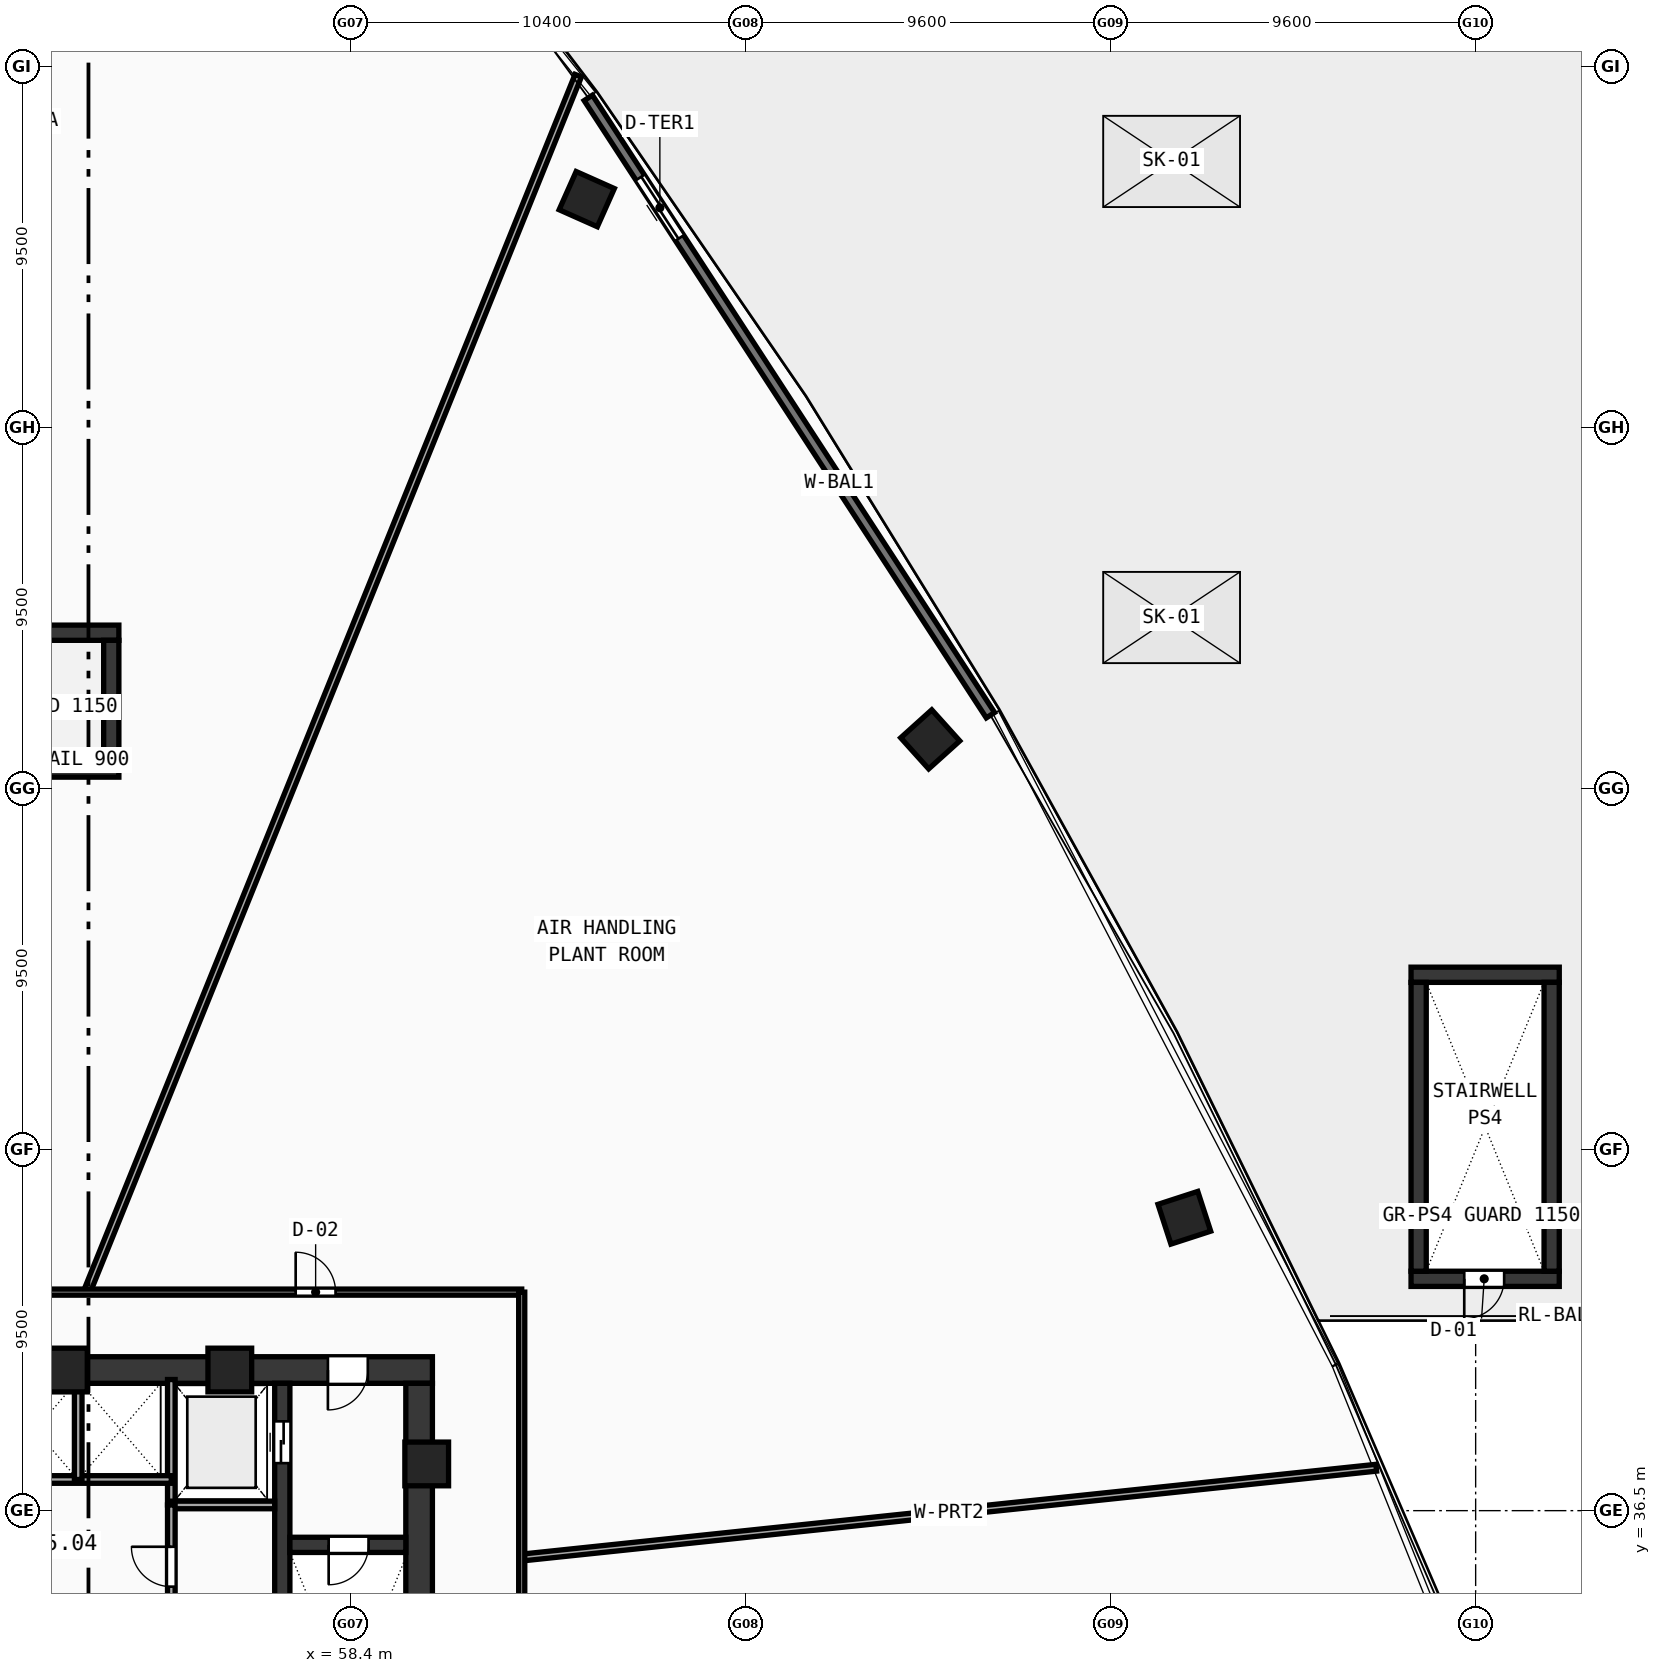
"""IFC4 building model, lengths in metres.
Left out: names, types, materials, properties, quantities, classifications, styles, units other than length and angle.
Written with IfcOpenShell. Run it as: python <this file> out.ifc"""

import sys

from ifc_helpers import new_model, si_unit, direction, frame, frame_2d, origin, origin_with_axes, origin_2d, place, context, subcontext, project, spatial, rectangle, hollow_rectangle, extrude, source, transform, mapped, element, fill, save


model = new_model("IFC4")
c1 = context("Model", 3, precision=1e-05, world=origin(), true_north=direction((0.0, 1.0)))
c2 = subcontext(c1, "Body", "Model", "MODEL_VIEW")
j1 = project(units=[si_unit("LENGTHUNIT", "METRE"), si_unit("PLANEANGLEUNIT", "RADIAN")], contexts=[c1])
p1 = place(None, origin())
s1 = spatial("IfcSite", under=j1, at=p1, CompositionType="ELEMENT")
p2 = place(p1, origin())
s2 = spatial("IfcBuilding", under=s1, at=p2, CompositionType="ELEMENT")
p3 = place(p2, frame((0.0, 0.0, 25.4)))
s3 = spatial("IfcBuildingStorey", under=s2, at=p3, CompositionType="ELEMENT", Elevation=25.4)
p4 = place(p3, frame((49.2, 40.2, 0.0), z_axis=(0.0, 0.0, 1.0), x_axis=(1.0, 0.0, 0.0)))
e1 = element("IfcWall", 1, at=p4, inside=s3, PredefinedType="SHEAR", context=c2, shape_type="SweptSolid", body=[
    extrude(rectangle(XDim=11.35, YDim=0.7, at=frame_2d((5.675, 0.0))), origin(), (0.0, 0.0, 1.0), 4.74),
])
p5 = place(p4, frame((8.6, 0.0, 0.0)))
e2 = element("IfcOpeningElement", 2, at=p5, cuts=e1, PredefinedType="OPENING", context=c2, shape_type="SweptSolid", body=[
    extrude(rectangle(XDim=1.05, YDim=2.1, at=frame_2d((0.525, 1.05))), frame((0.0, 0.36, 0.0), z_axis=(0.0, -1.0, 0.0), x_axis=(1.0, 0.0, 0.0)), (0.0, 0.0, 1.0), 0.72),
])
p6 = place(p3, frame((60.2, 27.85, 0.0), z_axis=(0.0, 0.0, 1.0), x_axis=(0.0, 1.0, 0.0)))
e3 = element("IfcWall", 3, at=p6, inside=s3, PredefinedType="SHEAR", context=c2, shape_type="SweptSolid", body=[
    extrude(rectangle(XDim=12.0, YDim=0.7, at=frame_2d((6.0, 0.0))), origin(), (0.0, 0.0, 1.0), 4.74),
])
p7 = place(p3, frame((56.6, 27.85, 0.0), z_axis=(0.0, 0.0, 1.0), x_axis=(0.0, 1.0, 0.0)))
e4 = element("IfcWall", 4, at=p7, inside=s3, PredefinedType="SHEAR", context=c2, shape_type="SweptSolid", body=[
    extrude(rectangle(XDim=12.0, YDim=0.4, at=frame_2d((6.0, 0.0))), origin(), (0.0, 0.0, 1.0), 4.74),
])
p8 = place(p7, frame((9.9, 0.0, 0.0)))
e5 = element("IfcOpeningElement", 5, at=p8, cuts=e4, PredefinedType="OPENING", context=c2, shape_type="SweptSolid", body=[
    extrude(rectangle(XDim=1.1, YDim=2.1, at=frame_2d((0.55, 1.05))), frame((0.0, 0.21, 0.0), z_axis=(0.0, -1.0, 0.0), x_axis=(1.0, 0.0, 0.0)), (0.0, 0.0, 1.0), 0.42),
])
p9 = place(p3, frame((56.8, 35.6, 0.0), z_axis=(0.0, 0.0, 1.0), x_axis=(1.0, 0.0, 0.0)))
e6 = element("IfcWall", 6, at=p9, inside=s3, PredefinedType="SHEAR", context=c2, shape_type="SweptSolid", body=[
    extrude(rectangle(XDim=3.05, YDim=0.4, at=frame_2d((1.525, 0.0))), origin(), (0.0, 0.0, 1.0), 4.74),
])
p10 = place(p9, frame((1.02, 0.0, 0.0)))
e7 = element("IfcOpeningElement", 7, at=p10, cuts=e6, PredefinedType="OPENING", context=c2, shape_type="SweptSolid", body=[
    extrude(rectangle(XDim=1.05, YDim=2.1, at=frame_2d((0.525, 1.05))), frame((0.0, 0.21, 0.0), z_axis=(0.0, -1.0, 0.0), x_axis=(1.0, 0.0, 0.0)), (0.0, 0.0, 1.0), 0.42),
])
p11 = place(p3, frame((86.3, 50.6, 0.0), z_axis=(0.0, 0.0, 1.0), x_axis=(1.0, 0.0, 0.0)))
e8 = element("IfcWall", 8, at=p11, inside=s3, PredefinedType="SHEAR", context=c2, shape_type="SweptSolid", body=[
    extrude(rectangle(XDim=3.9, YDim=0.4, at=frame_2d((1.95, 0.0))), origin(), (0.0, 0.0, 1.0), 4.74),
])
p12 = place(p3, frame((86.3, 42.6, 0.0), z_axis=(0.0, 0.0, 1.0), x_axis=(1.0, 0.0, 0.0)))
e9 = element("IfcWall", 9, at=p12, inside=s3, PredefinedType="SHEAR", context=c2, shape_type="SweptSolid", body=[
    extrude(rectangle(XDim=3.9, YDim=0.4, at=frame_2d((1.95, 0.0))), origin(), (0.0, 0.0, 1.0), 4.74),
])
p13 = place(p12, frame((1.4, 0.0, 0.0)))
e10 = element("IfcOpeningElement", 10, at=p13, cuts=e9, PredefinedType="OPENING", context=c2, shape_type="SweptSolid", body=[
    extrude(rectangle(XDim=1.05, YDim=2.1, at=frame_2d((0.525, 1.05))), frame((0.0, 0.21, 0.0), z_axis=(0.0, -1.0, 0.0), x_axis=(1.0, 0.0, 0.0)), (0.0, 0.0, 1.0), 0.42),
])
for number, where, z_axis, x_axis in (
    (11, (86.5, 42.8, 0.0), (0.0, 0.0, 1.0), (0.0, 1.0, 0.0)),
    (12, (90.0, 42.8, 0.0), (0.0, 0.0, 1.0), (0.0, 1.0, 0.0)),
):
    element("IfcWall", number, at=place(p3, frame(where, z_axis=z_axis, x_axis=x_axis)), inside=s3, PredefinedType="SHEAR", context=c2, shape_type="SweptSolid", body=[
        extrude(rectangle(XDim=7.6, YDim=0.4, at=frame_2d((3.8, 0.0))), origin(), (0.0, 0.0, 1.0), 4.74),
    ])
p14 = place(p3, frame((43.8, 59.6, 0.0), z_axis=(0.0, 0.0, 1.0), x_axis=(1.0, 0.0, 0.0)))
e13 = element("IfcWall", 13, at=p14, inside=s3, PredefinedType="SHEAR", context=c2, shape_type="SweptSolid", body=[
    extrude(rectangle(XDim=8.5, YDim=0.4, at=frame_2d((4.25, 0.0))), origin(), (0.0, 0.0, 1.0), 4.74),
])
p15 = place(p3, frame((43.8, 56.0, 0.0), z_axis=(0.0, 0.0, 1.0), x_axis=(1.0, 0.0, 0.0)))
e14 = element("IfcWall", 14, at=p15, inside=s3, PredefinedType="SHEAR", context=c2, shape_type="SweptSolid", body=[
    extrude(rectangle(XDim=8.5, YDim=0.4, at=frame_2d((4.25, 0.0))), origin(), (0.0, 0.0, 1.0), 4.74),
])
p16 = place(p15, frame((0.62, 0.0, 0.0)))
e15 = element("IfcOpeningElement", 15, at=p16, cuts=e14, PredefinedType="OPENING", context=c2, shape_type="SweptSolid", body=[
    extrude(rectangle(XDim=1.05, YDim=2.1, at=frame_2d((0.525, 1.05))), frame((0.0, 0.21, 0.0), z_axis=(0.0, -1.0, 0.0), x_axis=(1.0, 0.0, 0.0)), (0.0, 0.0, 1.0), 0.42),
])
p17 = place(p3, frame((52.1, 56.2, 0.0), z_axis=(0.0, 0.0, 1.0), x_axis=(0.0, 1.0, 0.0)))
e16 = element("IfcWall", 16, at=p17, inside=s3, PredefinedType="SHEAR", context=c2, shape_type="SweptSolid", body=[
    extrude(rectangle(XDim=3.2, YDim=0.4, at=frame_2d((1.6, 0.0))), origin(), (0.0, 0.0, 1.0), 4.74),
])
m1 = source(origin(), c2, "Body", "SweptSolid", [
    extrude(hollow_rectangle(XDim=1.15, YDim=1.15, WallThickness=0.048, at=origin_2d()), origin(), (0.0, 0.0, 1.0), 5.02),
])
for number, where, z_axis, x_axis in (
    (17, (60.4, 37.729, -0.28), (0.0, 0.0, 1.0), (1.0, 0.0, 0.0)),
    (18, (55.219, 40.2, -0.28), (0.0, 0.0, 1.0), (1.0, 0.0, 0.0)),
    (19, (50.894, 40.2, -0.28), (0.0, 0.0, 1.0), (1.0, 0.0, 0.0)),
):
    element("IfcColumn", number, at=place(p3, frame(where, z_axis=z_axis, x_axis=x_axis)), inside=s3, PredefinedType="COLUMN", context=c2, shape_type="MappedRepresentation", body=[
        mapped(m1, transform((0.0, 0.0, 0.0), scale=1.0)),
    ])
m2 = source(origin(), c2, "Body", "SweptSolid", [
    extrude(hollow_rectangle(XDim=1.1, YDim=1.1, WallThickness=0.045, at=origin_2d()), origin(), (0.0, 0.0, 1.0), 5.02),
])
for number, where, z_axis, x_axis in (
    (20, (80.335, 44.206, -0.28), (0.0, 0.0, 1.0), (-0.309, 0.951, 0.0)),
    (21, (73.649, 56.794, -0.28), (0.0, 0.0, 1.0), (-0.669, 0.743, 0.0)),
    (22, (64.611, 71.009, -0.28), (0.0, 0.0, 1.0), (-0.914, 0.407, 0.0)),
):
    element("IfcColumn", number, at=place(p3, frame(where, z_axis=z_axis, x_axis=x_axis)), inside=s3, PredefinedType="COLUMN", context=c2, shape_type="MappedRepresentation", body=[
        mapped(m2, transform((0.0, 0.0, 0.0), scale=1.0)),
    ])
p18 = place(p3, frame((75.233, 57.429, 0.0), z_axis=(0.0, 0.0, 1.0), x_axis=(-0.54584859594, 0.837883828648, 0.0)))
e23 = element("IfcWall", 23, at=p18, inside=s3, PredefinedType="STANDARD", context=c2, shape_type="SweptSolid", body=[
    extrude(rectangle(XDim=19.386, YDim=0.26, at=frame_2d((9.693, 0.0))), origin(), (0.0, 0.0, 1.0), 4.24),
])
p19 = place(p18, frame((14.986, 0.0, 0.0)))
e24 = element("IfcOpeningElement", 24, at=p19, cuts=e23, PredefinedType="OPENING", context=c2, shape_type="SweptSolid", body=[
    extrude(rectangle(XDim=1.9, YDim=2.2, at=frame_2d((0.95, 1.1))), frame((0.0, 0.14, 0.0), z_axis=(0.0, -1.0, 0.0), x_axis=(1.0, 0.0, 0.0)), (0.0, 0.0, 1.0), 0.28),
])
p20 = place(p3, frame((53.68, 36.65, 0.0), z_axis=(0.0, 0.0, 1.0), x_axis=(0.0, 1.0, 0.0)))
e25 = element("IfcWall", 25, at=p20, inside=s3, PredefinedType="SOLIDWALL", context=c2, shape_type="SweptSolid", body=[
    extrude(rectangle(XDim=3.3, YDim=0.2, at=frame_2d((1.65, 0.0))), origin(), (0.0, 0.0, 1.0), 4.74),
])
p21 = place(p3, frame((53.68, 36.65, 0.0), z_axis=(0.0, 0.0, 1.0), x_axis=(1.0, 0.0, 0.0)))
e26 = element("IfcWall", 26, at=p21, inside=s3, PredefinedType="SOLIDWALL", context=c2, shape_type="SweptSolid", body=[
    extrude(rectangle(XDim=2.72, YDim=0.2, at=frame_2d((1.36, 0.0))), origin(), (0.0, 0.0, 1.0), 4.74),
])
p22 = place(p3, frame((48.95, 37.32, 0.0), z_axis=(0.0, 0.0, 1.0), x_axis=(1.0, 0.0, 0.0)))
e27 = element("IfcWall", 27, at=p22, inside=s3, PredefinedType="SOLIDWALL", context=c2, shape_type="SweptSolid", body=[
    extrude(rectangle(XDim=4.73, YDim=0.2, at=frame_2d((2.365, 0.0))), origin(), (0.0, 0.0, 1.0), 4.74),
])
p23 = place(p3, frame((51.23, 37.32, 0.0), z_axis=(0.0, 0.0, 1.0), x_axis=(0.0, 1.0, 0.0)))
e28 = element("IfcWall", 28, at=p23, inside=s3, PredefinedType="SOLIDWALL", context=c2, shape_type="SweptSolid", body=[
    extrude(rectangle(XDim=2.63, YDim=0.2, at=frame_2d((1.315, 0.0))), origin(), (0.0, 0.0, 1.0), 4.74),
])
p24 = place(p3, frame((53.68, 27.6, 0.0), z_axis=(0.0, 0.0, 1.0), x_axis=(0.0, 1.0, 0.0)))
e29 = element("IfcWall", 29, at=p24, inside=s3, PredefinedType="SOLIDWALL", context=c2, shape_type="SweptSolid", body=[
    extrude(rectangle(XDim=9.05, YDim=0.2, at=frame_2d((4.525, 0.0))), origin(), (0.0, 0.0, 1.0), 4.74),
])
p25 = place(p24, frame((6.9, 0.0, 0.0)))
e30 = element("IfcOpeningElement", 30, at=p25, cuts=e29, PredefinedType="OPENING", context=c2, shape_type="SweptSolid", body=[
    extrude(rectangle(XDim=1.05, YDim=2.1, at=frame_2d((0.525, 1.05))), frame((0.0, 0.11, 0.0), z_axis=(0.0, -1.0, 0.0), x_axis=(1.0, 0.0, 0.0)), (0.0, 0.0, 1.0), 0.22),
])
p26 = place(p3, frame((62.9, 35.266, 0.0), z_axis=(0.0, 0.0, 1.0), x_axis=(0.994522243654, 0.104525149493, 0.0)))
e31 = element("IfcWall", 31, at=p26, inside=s3, PredefinedType="PARTITIONING", context=c2, shape_type="SweptSolid", body=[
    extrude(rectangle(XDim=22.61, YDim=0.18, at=frame_2d((11.305, 0.0))), origin(), (0.0, 0.0, 1.0), 4.04),
])
p27 = place(p3, frame((51.454, 42.25, 0.0), z_axis=(0.0, 0.0, 1.0), x_axis=(0.37460745467, 0.927183506597, 0.0)))
e32 = element("IfcWall", 32, at=p27, inside=s3, PredefinedType="PARTITIONING", context=c2, shape_type="SweptSolid", body=[
    extrude(rectangle(XDim=34.522, YDim=0.18, at=frame_2d((17.261, 0.0))), origin(), (0.0, 0.0, 1.0), 4.04),
])
p28 = place(p3, frame((45.85, 42.25, 0.0), z_axis=(0.0, 0.0, 1.0), x_axis=(1.0, 0.0, 0.0)))
e33 = element("IfcWall", 33, at=p28, inside=s3, PredefinedType="PARTITIONING", context=c2, shape_type="SweptSolid", body=[
    extrude(rectangle(XDim=17.05, YDim=0.16, at=frame_2d((8.525, 0.0))), origin(), (0.0, 0.0, 1.0), 4.04),
])
p29 = place(p28, frame((11.102, 0.0, 0.0)))
e34 = element("IfcOpeningElement", 34, at=p29, cuts=e33, PredefinedType="OPENING", context=c2, shape_type="SweptSolid", body=[
    extrude(rectangle(XDim=1.05, YDim=2.1, at=frame_2d((0.525, 1.05))), frame((0.0, 0.09, 0.0), z_axis=(0.0, -1.0, 0.0), x_axis=(1.0, 0.0, 0.0)), (0.0, 0.0, 1.0), 0.18),
])
p30 = place(p3, frame((62.9, 42.25, 0.0), z_axis=(0.0, 0.0, 1.0), x_axis=(0.0, -1.0, 0.0)))
e35 = element("IfcWall", 35, at=p30, inside=s3, PredefinedType="PARTITIONING", context=c2, shape_type="SweptSolid", body=[
    extrude(rectangle(XDim=17.35, YDim=0.16, at=frame_2d((8.675, 0.0))), origin(), (0.0, 0.0, 1.0), 4.04),
])
p31 = place(p30, frame((11.942, 0.0, 0.0)))
e36 = element("IfcOpeningElement", 36, at=p31, cuts=e35, PredefinedType="OPENING", context=c2, shape_type="SweptSolid", body=[
    extrude(rectangle(XDim=1.05, YDim=2.1, at=frame_2d((0.525, 1.05))), frame((0.0, 0.09, 0.0), z_axis=(0.0, -1.0, 0.0), x_axis=(1.0, 0.0, 0.0)), (0.0, 0.0, 1.0), 0.18),
])
p32 = place(p3, frame((0.0, 0.0, -0.28)))
p33 = place(p32, frame((80.0, 60.0, -0.01)))
p34 = place(p33, frame((0.0, 0.0, 0.24)))
e37 = element("IfcWindow", 37, at=p34, inside=s3, PartitioningType="SINGLE_PANEL", PredefinedType="SKYLIGHT", context=c2, shape_type="SweptSolid", body=[
    extrude(rectangle(XDim=3.6, YDim=2.4, at=origin_2d()), origin(), (0.0, 0.0, 1.0), 0.05),
])
p35 = place(p32, frame((80.0, 72.0, -0.01)))
p36 = place(p35, frame((0.0, 0.0, 0.24)))
e38 = element("IfcWindow", 38, at=p36, inside=s3, PartitioningType="SINGLE_PANEL", PredefinedType="SKYLIGHT", context=c2, shape_type="SweptSolid", body=[
    extrude(rectangle(XDim=3.6, YDim=2.4, at=origin_2d()), origin(), (0.0, 0.0, 1.0), 0.05),
])
m3 = source(origin(), c2, "Body", "SweptSolid", [
    extrude(rectangle(XDim=1.9, YDim=2.2, at=frame_2d((0.95, 1.1))), frame((0.0, 0.025, 0.0), z_axis=(0.0, -1.0, 0.0), x_axis=(1.0, 0.0, 0.0)), (0.0, 0.0, 1.0), 0.05),
])
p37 = place(p19, origin_with_axes())
e39 = element("IfcDoor", 39, at=p37, inside=s3, OperationType="DOUBLE_DOOR_SLIDING", PredefinedType="DOOR", context=c2, shape_type="MappedRepresentation", body=[
    mapped(m3, transform((0.0, 0.0, 0.0), scale=1.0)),
])
fill(e24, e39)
m4 = source(origin(), c2, "Body", "SweptSolid", [
    extrude(rectangle(XDim=1.05, YDim=2.1, at=frame_2d((0.525, 1.05))), frame((0.0, 0.025, 0.0), z_axis=(0.0, -1.0, 0.0), x_axis=(1.0, 0.0, 0.0)), (0.0, 0.0, 1.0), 0.05),
])
p38 = place(p10, frame((1.05, 0.0, 0.0), z_axis=(0.0, 0.0, 1.0), x_axis=(-1.0, 0.0, 0.0)))
e40 = element("IfcDoor", 40, at=p38, inside=s3, OperationType="SINGLE_SWING_RIGHT", PredefinedType="DOOR", context=c2, shape_type="MappedRepresentation", body=[
    mapped(m4, transform((0.0, 0.0, 0.0), scale=1.0)),
])
fill(e7, e40)
p39 = place(p5, frame((1.05, 0.0, 0.0), z_axis=(0.0, 0.0, 1.0), x_axis=(-1.0, 0.0, 0.0)))
e41 = element("IfcDoor", 41, at=p39, inside=s3, OperationType="SINGLE_SWING_RIGHT", PredefinedType="DOOR", context=c2, shape_type="MappedRepresentation", body=[
    mapped(m4, transform((0.0, 0.0, 0.0), scale=1.0)),
])
fill(e2, e41)
m5 = source(origin(), c2, "Body", "SweptSolid", [
    extrude(rectangle(XDim=1.1, YDim=2.1, at=frame_2d((0.55, 1.05))), frame((0.0, 0.025, 0.0), z_axis=(0.0, -1.0, 0.0), x_axis=(1.0, 0.0, 0.0)), (0.0, 0.0, 1.0), 0.05),
])
p40 = place(p8, origin_with_axes())
e42 = element("IfcDoor", 42, at=p40, inside=s3, OperationType="DOUBLE_DOOR_SLIDING", PredefinedType="DOOR", context=c2, shape_type="MappedRepresentation", body=[
    mapped(m5, transform((0.0, 0.0, 0.0), scale=1.0)),
])
fill(e5, e42)
p41 = place(p25, origin_with_axes())
e43 = element("IfcDoor", 43, at=p41, inside=s3, OperationType="SINGLE_SWING_RIGHT", PredefinedType="DOOR", context=c2, shape_type="MappedRepresentation", body=[
    mapped(m4, transform((0.0, 0.0, 0.0), scale=1.0)),
])
fill(e30, e43)
p42 = place(p29, origin_with_axes())
e44 = element("IfcDoor", 44, at=p42, inside=s3, OperationType="SINGLE_SWING_LEFT", PredefinedType="DOOR", context=c2, shape_type="MappedRepresentation", body=[
    mapped(m4, transform((0.0, 0.0, 0.0), scale=1.0)),
])
fill(e34, e44)
p43 = place(p13, frame((1.05, 0.0, 0.0), z_axis=(0.0, 0.0, 1.0), x_axis=(-1.0, 0.0, 0.0)))
e45 = element("IfcDoor", 45, at=p43, inside=s3, OperationType="SINGLE_SWING_RIGHT", PredefinedType="DOOR", context=c2, shape_type="MappedRepresentation", body=[
    mapped(m4, transform((0.0, 0.0, 0.0), scale=1.0)),
])
fill(e10, e45)
save(model, sys.argv[1])
